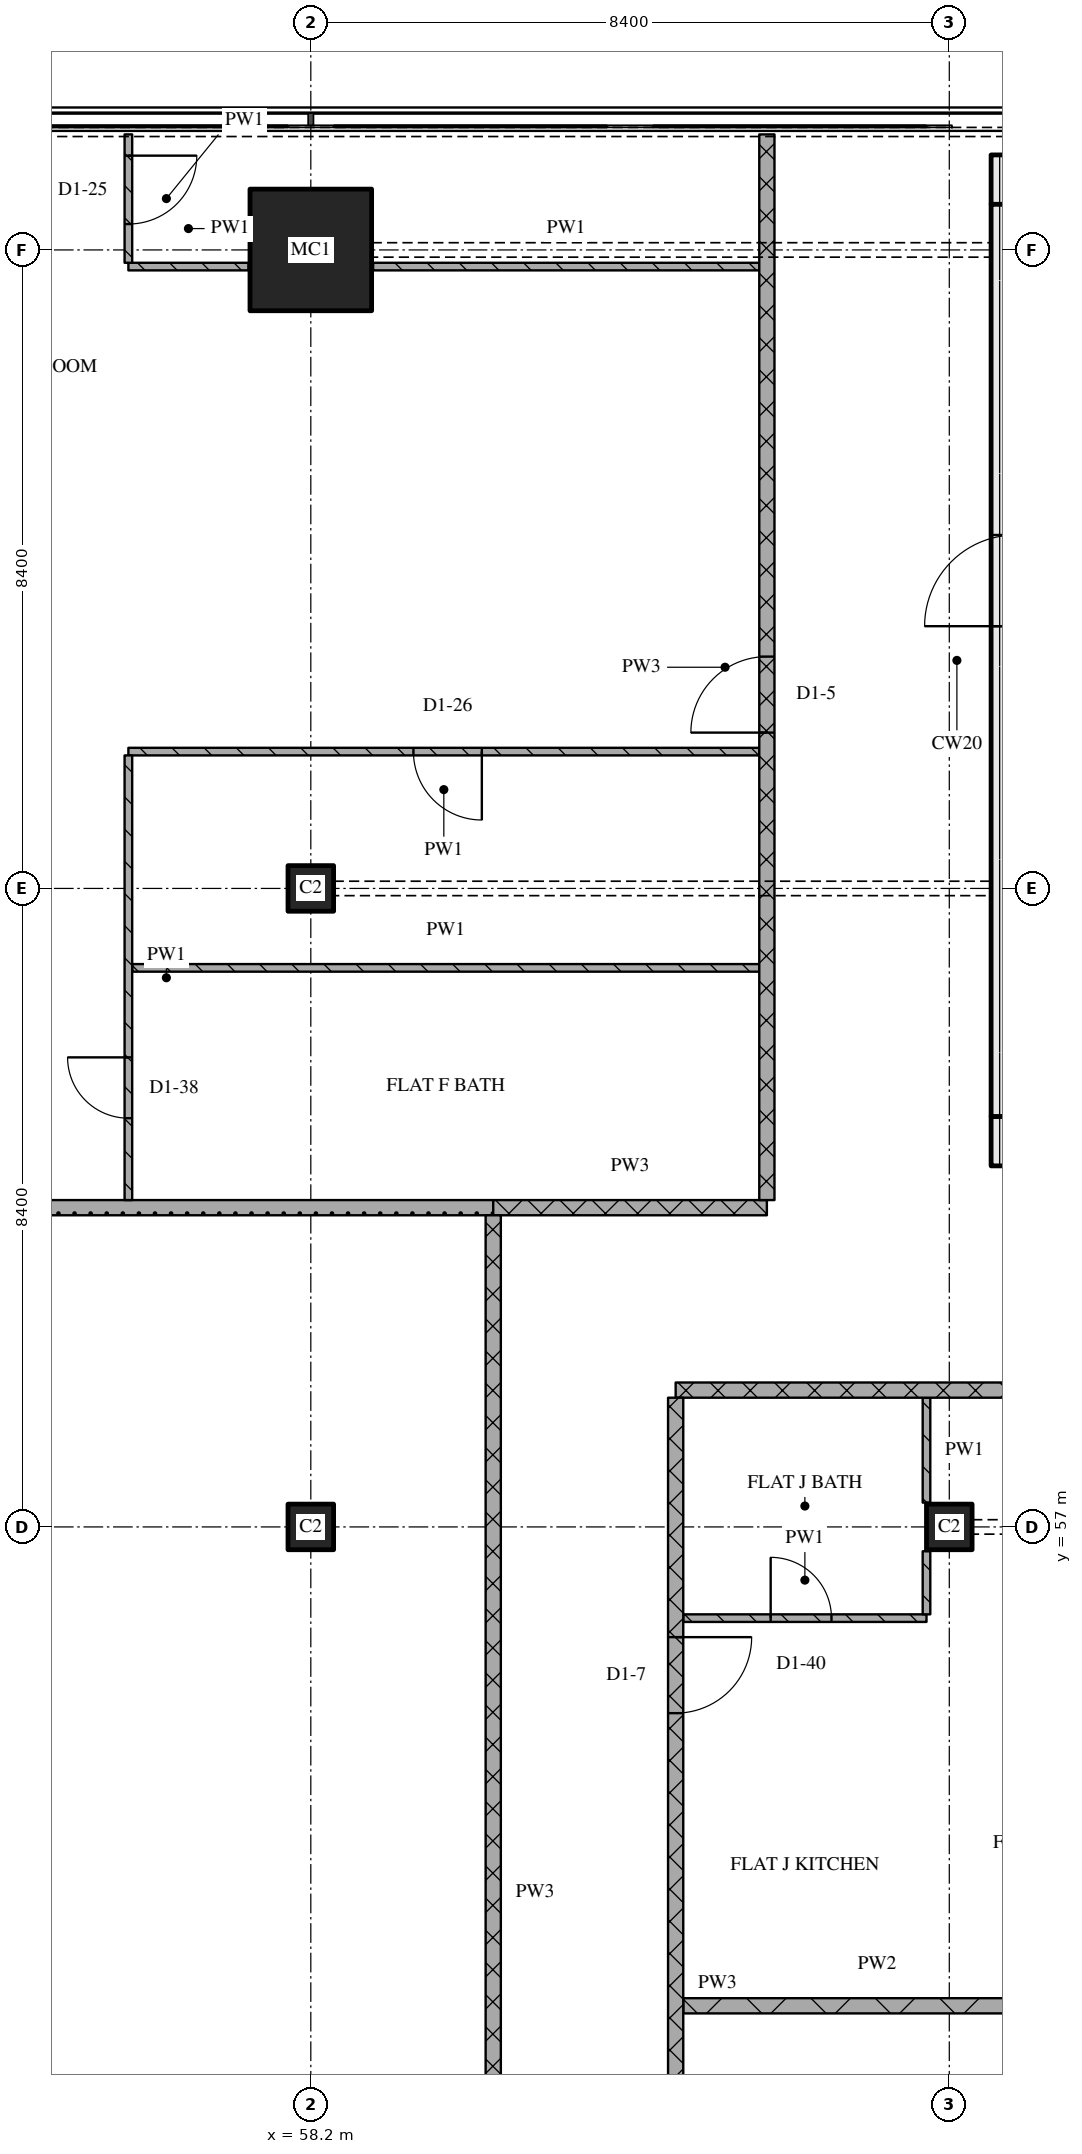
"""IFC4 building model, lengths in metres.
Left out: names, types, materials, properties, quantities, classifications, styles, units other than length and angle.
Written with IfcOpenShell. Run it as: python <this file> out.ifc"""

import sys

from ifc_helpers import new_model, si_unit, direction, frame, frame_2d, origin, origin_2d, place, context, subcontext, project, spatial, rectangle, extrude, element, fill, save


model = new_model("IFC4")
c1 = context("Model", 3, precision=1e-05, world=origin(), true_north=direction((0.0, 1.0)))
c2 = subcontext(c1, "Body", "Model", "MODEL_VIEW")
j1 = project(units=[si_unit("LENGTHUNIT", "METRE"), si_unit("PLANEANGLEUNIT", "RADIAN")], contexts=[c1])
p1 = place(None, origin())
s1 = spatial("IfcSite", under=j1, at=p1, CompositionType="ELEMENT")
p2 = place(p1, origin())
s2 = spatial("IfcBuilding", under=s1, at=p2, CompositionType="ELEMENT")
p3 = place(p2, frame((0.0, 0.0, 209.1)))
s3 = spatial("IfcBuildingStorey", under=s2, at=p3, CompositionType="ELEMENT", Elevation=209.1)
for number, where, z_axis, x_axis in (
    (1, (58.2, 57.0, 0.0), (0.0, 0.0, 1.0), (1.0, 0.0, 0.0)),
    (2, (58.2, 65.4, 0.0), (0.0, 0.0, 1.0), (1.0, 0.0, 0.0)),
):
    element("IfcColumn", number, at=place(p3, frame(where, z_axis=z_axis, x_axis=x_axis)), inside=s3, PredefinedType="COLUMN", context=c2, shape_type="SweptSolid", body=[
        extrude(rectangle(XDim=0.6, YDim=0.6, at=origin_2d()), origin(), (0.0, 0.0, 1.0), 3.6),
    ])
p4 = place(p3, frame((58.2, 73.8, 0.0), z_axis=(0.0, 0.0, 1.0), x_axis=(1.0, 0.0, 0.0)))
e3 = element("IfcColumn", 3, at=p4, inside=s3, PredefinedType="COLUMN", context=c2, shape_type="SweptSolid", body=[
    extrude(rectangle(XDim=1.6, YDim=1.6, at=origin_2d()), origin(), (0.0, 0.0, 1.0), 3.6),
])
p5 = place(p3, frame((66.6, 57.0, 0.0), z_axis=(0.0, 0.0, 1.0), x_axis=(1.0, 0.0, 0.0)))
e4 = element("IfcColumn", 4, at=p5, inside=s3, PredefinedType="COLUMN", context=c2, shape_type="SweptSolid", body=[
    extrude(rectangle(XDim=0.6, YDim=0.6, at=origin_2d()), origin(), (0.0, 0.0, 1.0), 3.6),
])
p6 = place(p3, frame((67.15, 62.075, 0.0), z_axis=(0.0, 0.0, 1.0), x_axis=(1.0, 0.0, 0.0)))
e5 = element("IfcWall", 5, at=p6, inside=s3, PredefinedType="SOLIDWALL", context=c2, shape_type="SweptSolid", body=[
    extrude(rectangle(XDim=40.9, YDim=0.65, at=frame_2d((20.45, 0.0))), origin(), (0.0, 0.0, 1.0), 3.32),
])
p7 = place(p6, frame((20.8, 0.0, 0.0)))
e6 = element("IfcOpeningElement", 6, at=p7, cuts=e5, PredefinedType="OPENING", context=c2, shape_type="SweptSolid", body=[
    extrude(rectangle(XDim=1.8, YDim=2.1, at=frame_2d((0.9, 1.05))), frame((0.0, 0.335, 0.0), z_axis=(0.0, -1.0, 0.0), x_axis=(1.0, 0.0, 0.0)), (0.0, 0.0, 1.0), 0.67),
])
p8 = place(p3, frame((67.15, 74.725, 0.0), z_axis=(0.0, 0.0, 1.0), x_axis=(1.0, 0.0, 0.0)))
e7 = element("IfcWall", 7, at=p8, inside=s3, PredefinedType="SOLIDWALL", context=c2, shape_type="SweptSolid", body=[
    extrude(rectangle(XDim=40.9, YDim=0.65, at=frame_2d((20.45, 0.0))), origin(), (0.0, 0.0, 1.0), 3.32),
])
p9 = place(p3, frame((67.475, 62.4, 0.0), z_axis=(0.0, 0.0, 1.0), x_axis=(0.0, 1.0, 0.0)))
e8 = element("IfcWall", 8, at=p9, inside=s3, PredefinedType="SOLIDWALL", context=c2, shape_type="SweptSolid", body=[
    extrude(rectangle(XDim=12.0, YDim=0.65, at=frame_2d((6.0, 0.0))), origin(), (0.0, 0.0, 1.0), 3.32),
])
p10 = place(p9, frame((6.45, 0.0, 0.0)))
e9 = element("IfcOpeningElement", 9, at=p10, cuts=e8, PredefinedType="OPENING", context=c2, shape_type="SweptSolid", body=[
    extrude(rectangle(XDim=1.2, YDim=2.1, at=frame_2d((0.6, 1.05))), frame((0.0, 0.335, 0.0), z_axis=(0.0, -1.0, 0.0), x_axis=(1.0, 0.0, 0.0)), (0.0, 0.0, 1.0), 0.67),
])
p11 = place(p3, frame((63.1, 50.7, 0.0), z_axis=(0.0, 0.0, 1.0), x_axis=(1.0, 0.0, 0.0)))
e10 = element("IfcWall", 10, at=p11, inside=s3, PredefinedType="PARTITIONING", context=c2, shape_type="SweptSolid", body=[
    extrude(rectangle(XDim=5.1, YDim=0.2, at=frame_2d((2.55, 0.0))), origin(), (0.0, 0.0, 1.0), 3.32),
])
p12 = place(p3, frame((63.1, 55.8, 0.0), z_axis=(0.0, 0.0, 1.0), x_axis=(1.0, 0.0, 0.0)))
e11 = element("IfcWall", 11, at=p12, inside=s3, PredefinedType="PARTITIONING", context=c2, shape_type="SweptSolid", body=[
    extrude(rectangle(XDim=3.2, YDim=0.1, at=frame_2d((1.6, 0.0))), origin(), (0.0, 0.0, 1.0), 3.32),
])
p13 = place(p12, frame((1.15, 0.0, 0.0)))
e12 = element("IfcOpeningElement", 12, at=p13, cuts=e11, PredefinedType="OPENING", context=c2, shape_type="SweptSolid", body=[
    extrude(rectangle(XDim=0.8, YDim=2.1, at=frame_2d((0.4, 1.05))), frame((0.0, 0.06, 0.0), z_axis=(0.0, -1.0, 0.0), x_axis=(1.0, 0.0, 0.0)), (0.0, 0.0, 1.0), 0.12),
])
p14 = place(p3, frame((63.0, 58.8, 0.0), z_axis=(0.0, 0.0, 1.0), x_axis=(1.0, 0.0, 0.0)))
e13 = element("IfcWall", 13, at=p14, inside=s3, PredefinedType="PARTITIONING", context=c2, shape_type="SweptSolid", body=[
    extrude(rectangle(XDim=10.8, YDim=0.2, at=frame_2d((5.4, 0.0))), origin(), (0.0, 0.0, 1.0), 3.32),
])
p15 = place(p3, frame((60.6, 61.2, 0.0), z_axis=(0.0, 0.0, 1.0), x_axis=(1.0, 0.0, 0.0)))
e14 = element("IfcWall", 14, at=p15, inside=s3, PredefinedType="PARTITIONING", context=c2, shape_type="SweptSolid", body=[
    extrude(rectangle(XDim=3.6, YDim=0.2, at=frame_2d((1.8, 0.0))), origin(), (0.0, 0.0, 1.0), 3.32),
])
p16 = place(p3, frame((48.28, 61.2, 0.0), z_axis=(0.0, 0.0, 1.0), x_axis=(1.0, 0.0, 0.0)))
e15 = element("IfcWall", 15, at=p16, inside=s3, PredefinedType="PARTITIONING", context=c2, shape_type="SweptSolid", body=[
    extrude(rectangle(XDim=12.32, YDim=0.2, at=frame_2d((6.16, 0.0))), origin(), (0.0, 0.0, 1.0), 3.32),
])
p17 = place(p3, frame((55.85, 64.355, 0.0), z_axis=(0.0, 0.0, 1.0), x_axis=(1.0, 0.0, 0.0)))
e16 = element("IfcWall", 16, at=p17, inside=s3, PredefinedType="PARTITIONING", context=c2, shape_type="SweptSolid", body=[
    extrude(rectangle(XDim=8.25, YDim=0.1, at=frame_2d((4.125, 0.0))), origin(), (0.0, 0.0, 1.0), 3.32),
])
p18 = place(p3, frame((64.1, 67.2, 0.0), z_axis=(0.0, 0.0, 1.0), x_axis=(-1.0, 0.0, 0.0)))
e17 = element("IfcWall", 17, at=p18, inside=s3, PredefinedType="PARTITIONING", context=c2, shape_type="SweptSolid", body=[
    extrude(rectangle(XDim=8.3, YDim=0.1, at=frame_2d((4.15, 0.0))), origin(), (0.0, 0.0, 1.0), 3.32),
])
p19 = place(p18, frame((3.65, 0.0, 0.0)))
e18 = element("IfcOpeningElement", 18, at=p19, cuts=e17, PredefinedType="OPENING", context=c2, shape_type="SweptSolid", body=[
    extrude(rectangle(XDim=0.9, YDim=2.1, at=frame_2d((0.45, 1.05))), frame((0.0, 0.06, 0.0), z_axis=(0.0, -1.0, 0.0), x_axis=(1.0, 0.0, 0.0)), (0.0, 0.0, 1.0), 0.12),
])
p20 = place(p3, frame((55.8, 73.581, 0.0), z_axis=(0.0, 0.0, 1.0), x_axis=(1.0, 0.0, 0.0)))
e19 = element("IfcWall", 19, at=p20, inside=s3, PredefinedType="PARTITIONING", context=c2, shape_type="SweptSolid", body=[
    extrude(rectangle(XDim=1.58, YDim=0.1, at=frame_2d((0.79, 0.0))), origin(), (0.0, 0.0, 1.0), 3.32),
])
p21 = place(p3, frame((59.02, 73.581, 0.0), z_axis=(0.0, 0.0, 1.0), x_axis=(1.0, 0.0, 0.0)))
e20 = element("IfcWall", 20, at=p21, inside=s3, PredefinedType="PARTITIONING", context=c2, shape_type="SweptSolid", body=[
    extrude(rectangle(XDim=5.08, YDim=0.1, at=frame_2d((2.54, 0.0))), origin(), (0.0, 0.0, 1.0), 3.32),
])
p22 = place(p3, frame((55.8, 67.15, 0.0), z_axis=(0.0, 0.0, 1.0), x_axis=(0.0, -1.0, 0.0)))
e21 = element("IfcWall", 21, at=p22, inside=s3, PredefinedType="PARTITIONING", context=c2, shape_type="SweptSolid", body=[
    extrude(rectangle(XDim=5.85, YDim=0.1, at=frame_2d((2.925, 0.0))), origin(), (0.0, 0.0, 1.0), 3.32),
])
p23 = place(p22, frame((3.973, 0.0, 0.0)))
e22 = element("IfcOpeningElement", 22, at=p23, cuts=e21, PredefinedType="OPENING", context=c2, shape_type="SweptSolid", body=[
    extrude(rectangle(XDim=0.8, YDim=2.1, at=frame_2d((0.4, 1.05))), frame((0.0, 0.06, 0.0), z_axis=(0.0, -1.0, 0.0), x_axis=(1.0, 0.0, 0.0)), (0.0, 0.0, 1.0), 0.12),
])
p24 = place(p3, frame((55.8, 75.32, 0.0), z_axis=(0.0, 0.0, 1.0), x_axis=(0.0, -1.0, 0.0)))
e23 = element("IfcWall", 23, at=p24, inside=s3, PredefinedType="PARTITIONING", context=c2, shape_type="SweptSolid", body=[
    extrude(rectangle(XDim=1.689, YDim=0.1, at=frame_2d((0.844, 0.0))), origin(), (0.0, 0.0, 1.0), 3.32),
])
p25 = place(p24, frame((0.28, 0.0, 0.0)))
e24 = element("IfcOpeningElement", 24, at=p25, cuts=e23, PredefinedType="OPENING", context=c2, shape_type="SweptSolid", body=[
    extrude(rectangle(XDim=0.9, YDim=2.1, at=frame_2d((0.45, 1.05))), frame((0.0, 0.06, 0.0), z_axis=(0.0, -1.0, 0.0), x_axis=(1.0, 0.0, 0.0)), (0.0, 0.0, 1.0), 0.12),
])
p26 = place(p3, frame((60.6, 61.1, 0.0), z_axis=(0.0, 0.0, 1.0), x_axis=(0.0, -1.0, 0.0)))
e25 = element("IfcWall", 25, at=p26, inside=s3, PredefinedType="PARTITIONING", context=c2, shape_type="SweptSolid", body=[
    extrude(rectangle(XDim=17.8, YDim=0.2, at=frame_2d((8.9, 0.0))), origin(), (0.0, 0.0, 1.0), 3.32),
])
p27 = place(p3, frame((63.0, 58.7, 0.0), z_axis=(0.0, 0.0, 1.0), x_axis=(0.0, -1.0, 0.0)))
e26 = element("IfcWall", 26, at=p27, inside=s3, PredefinedType="PARTITIONING", context=c2, shape_type="SweptSolid", body=[
    extrude(rectangle(XDim=15.4, YDim=0.2, at=frame_2d((7.7, 0.0))), origin(), (0.0, 0.0, 1.0), 3.32),
])
p28 = place(p27, frame((3.15, 0.0, 0.0)))
e27 = element("IfcOpeningElement", 27, at=p28, cuts=e26, PredefinedType="OPENING", context=c2, shape_type="SweptSolid", body=[
    extrude(rectangle(XDim=1.0, YDim=2.1, at=frame_2d((0.5, 1.05))), frame((0.0, 0.11, 0.0), z_axis=(0.0, -1.0, 0.0), x_axis=(1.0, 0.0, 0.0)), (0.0, 0.0, 1.0), 0.22),
])
p29 = place(p27, frame((11.25, 0.0, 0.0)))
e28 = element("IfcOpeningElement", 28, at=p29, cuts=e26, PredefinedType="OPENING", context=c2, shape_type="SweptSolid", body=[
    extrude(rectangle(XDim=0.9, YDim=2.1, at=frame_2d((0.45, 1.05))), frame((0.0, 0.11, 0.0), z_axis=(0.0, -1.0, 0.0), x_axis=(1.0, 0.0, 0.0)), (0.0, 0.0, 1.0), 0.22),
])
p30 = place(p3, frame((64.2, 61.3, 0.0), z_axis=(0.0, 0.0, 1.0), x_axis=(0.0, 1.0, 0.0)))
e29 = element("IfcWall", 29, at=p30, inside=s3, PredefinedType="PARTITIONING", context=c2, shape_type="SweptSolid", body=[
    extrude(rectangle(XDim=14.02, YDim=0.2, at=frame_2d((7.01, 0.0))), origin(), (0.0, 0.0, 1.0), 3.32),
])
p31 = place(p30, frame((6.15, 0.0, 0.0)))
e30 = element("IfcOpeningElement", 30, at=p31, cuts=e29, PredefinedType="OPENING", context=c2, shape_type="SweptSolid", body=[
    extrude(rectangle(XDim=1.0, YDim=2.1, at=frame_2d((0.5, 1.05))), frame((0.0, 0.11, 0.0), z_axis=(0.0, -1.0, 0.0), x_axis=(1.0, 0.0, 0.0)), (0.0, 0.0, 1.0), 0.22),
])
p32 = place(p3, frame((66.3, 56.68, 0.0), z_axis=(0.0, 0.0, 1.0), x_axis=(0.0, -1.0, 0.0)))
e31 = element("IfcWall", 31, at=p32, inside=s3, PredefinedType="PARTITIONING", context=c2, shape_type="SweptSolid", body=[
    extrude(rectangle(XDim=0.83, YDim=0.1, at=frame_2d((0.415, 0.0))), origin(), (0.0, 0.0, 1.0), 3.32),
])
p33 = place(p3, frame((66.3, 58.7, 0.0), z_axis=(0.0, 0.0, 1.0), x_axis=(0.0, -1.0, 0.0)))
e32 = element("IfcWall", 32, at=p33, inside=s3, PredefinedType="PARTITIONING", context=c2, shape_type="SweptSolid", body=[
    extrude(rectangle(XDim=1.38, YDim=0.1, at=frame_2d((0.69, 0.0))), origin(), (0.0, 0.0, 1.0), 3.32),
])
p34 = place(p13, origin())
e33 = element("IfcDoor", 33, at=p34, inside=s3, OperationType="SINGLE_SWING_LEFT", PredefinedType="DOOR", context=c2, shape_type="SweptSolid", body=[
    extrude(rectangle(XDim=0.8, YDim=2.1, at=frame_2d((0.4, 1.05))), frame((0.0, 0.025, 0.0), z_axis=(0.0, -1.0, 0.0), x_axis=(1.0, 0.0, 0.0)), (0.0, 0.0, 1.0), 0.05),
])
fill(e12, e33)
p35 = place(p19, origin())
e34 = element("IfcDoor", 34, at=p35, inside=s3, OperationType="SINGLE_SWING_LEFT", PredefinedType="DOOR", context=c2, shape_type="SweptSolid", body=[
    extrude(rectangle(XDim=0.9, YDim=2.1, at=frame_2d((0.45, 1.05))), frame((0.0, 0.025, 0.0), z_axis=(0.0, -1.0, 0.0), x_axis=(1.0, 0.0, 0.0)), (0.0, 0.0, 1.0), 0.05),
])
fill(e18, e34)
p36 = place(p23, origin())
e35 = element("IfcDoor", 35, at=p36, inside=s3, OperationType="SINGLE_SWING_RIGHT", PredefinedType="DOOR", context=c2, shape_type="SweptSolid", body=[
    extrude(rectangle(XDim=0.8, YDim=2.1, at=frame_2d((0.4, 1.05))), frame((0.0, 0.025, 0.0), z_axis=(0.0, -1.0, 0.0), x_axis=(1.0, 0.0, 0.0)), (0.0, 0.0, 1.0), 0.05),
])
fill(e22, e35)
p37 = place(p25, origin())
e36 = element("IfcDoor", 36, at=p37, inside=s3, OperationType="SINGLE_SWING_LEFT", PredefinedType="DOOR", context=c2, shape_type="SweptSolid", body=[
    extrude(rectangle(XDim=0.9, YDim=2.1, at=frame_2d((0.45, 1.05))), frame((0.0, 0.025, 0.0), z_axis=(0.0, -1.0, 0.0), x_axis=(1.0, 0.0, 0.0)), (0.0, 0.0, 1.0), 0.05),
])
fill(e24, e36)
p38 = place(p28, origin())
e37 = element("IfcDoor", 37, at=p38, inside=s3, OperationType="SINGLE_SWING_LEFT", PredefinedType="DOOR", context=c2, shape_type="SweptSolid", body=[
    extrude(rectangle(XDim=1.0, YDim=2.1, at=frame_2d((0.5, 1.05))), frame((0.0, 0.025, 0.0), z_axis=(0.0, -1.0, 0.0), x_axis=(1.0, 0.0, 0.0)), (0.0, 0.0, 1.0), 0.05),
])
fill(e27, e37)
p39 = place(p31, origin())
e38 = element("IfcDoor", 38, at=p39, inside=s3, OperationType="SINGLE_SWING_LEFT", PredefinedType="DOOR", context=c2, shape_type="SweptSolid", body=[
    extrude(rectangle(XDim=1.0, YDim=2.1, at=frame_2d((0.5, 1.05))), frame((0.0, 0.025, 0.0), z_axis=(0.0, -1.0, 0.0), x_axis=(1.0, 0.0, 0.0)), (0.0, 0.0, 1.0), 0.05),
])
fill(e30, e38)
save(model, sys.argv[1])
